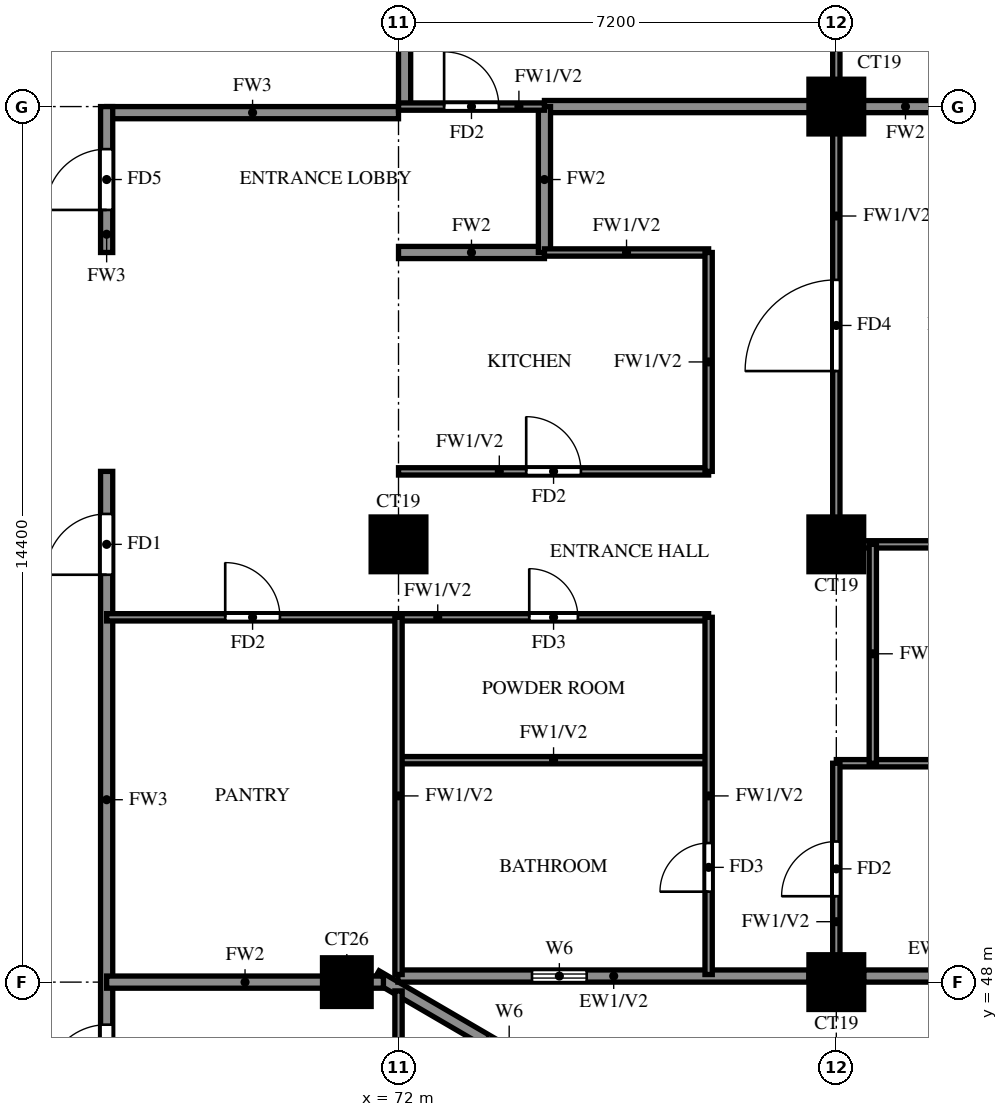
"""IFC4 building model, lengths in metres.
Left out: names, types, materials, properties, quantities, classifications, styles, units other than length and angle.
Written with IfcOpenShell. Run it as: python <this file> out.ifc"""

import sys

from ifc_helpers import new_model, si_unit, direction, frame, frame_2d, origin, origin_2d, place, context, subcontext, project, spatial, rectangle, extrude, source, transform, mapped, element, fill, save


model = new_model("IFC4")
c1 = context("Model", 3, precision=1e-05, world=origin(), true_north=direction((0.0, 1.0)))
c2 = subcontext(c1, "Body", "Model", "MODEL_VIEW")
j1 = project(units=[si_unit("LENGTHUNIT", "METRE"), si_unit("PLANEANGLEUNIT", "RADIAN")], contexts=[c1])
p1 = place(None, origin())
s1 = spatial("IfcSite", under=j1, at=p1, CompositionType="ELEMENT")
p2 = place(p1, origin())
s2 = spatial("IfcBuilding", under=s1, at=p2, CompositionType="ELEMENT")
p3 = place(p2, frame((0.0, 0.0, 195.5)))
s3 = spatial("IfcBuildingStorey", under=s2, at=p3, CompositionType="ELEMENT", Elevation=195.5)
m1 = source(origin(), c2, "Body", "SweptSolid", [
    extrude(rectangle(XDim=0.8, YDim=0.8, at=origin_2d()), origin(), (0.0, 0.0, 1.0), 3.2),
])
p4 = place(p3, frame((71.15, 48.0, 0.0), z_axis=(0.0, 0.0, 1.0), x_axis=(1.0, 0.0, 0.0)))
e1 = element("IfcColumn", 1, at=p4, inside=s3, PredefinedType="COLUMN", context=c2, shape_type="MappedRepresentation", body=[
    mapped(m1, transform((0.0, 0.0, 0.0))),
])
m2 = source(origin(), c2, "Body", "SweptSolid", [
    extrude(rectangle(XDim=0.9, YDim=0.9, at=origin_2d()), origin(), (0.0, 0.0, 1.0), 3.2),
])
for number, where, z_axis, x_axis in (
    (2, (79.2, 48.0, 0.0), (0.0, 0.0, 1.0), (1.0, 0.0, 0.0)),
    (3, (72.0, 55.2, 0.0), (0.0, 0.0, 1.0), (1.0, 0.0, 0.0)),
    (4, (79.2, 55.2, 0.0), (0.0, 0.0, 1.0), (1.0, 0.0, 0.0)),
    (5, (79.2, 62.4, 0.0), (0.0, 0.0, 1.0), (1.0, 0.0, 0.0)),
):
    element("IfcColumn", number, at=place(p3, frame(where, z_axis=z_axis, x_axis=x_axis)), inside=s3, PredefinedType="COLUMN", context=c2, shape_type="MappedRepresentation", body=[
        mapped(m2, transform((0.0, 0.0, 0.0))),
    ])
p5 = place(p3, frame((85.719, 39.881, 0.0), z_axis=(0.0, 0.0, 1.0), x_axis=(-0.86377618652, 0.503875678716, 0.0)))
e6 = element("IfcWall", 6, at=p5, inside=s3, PredefinedType="SOLIDWALL", context=c2, shape_type="SweptSolid", body=[
    extrude(rectangle(XDim=16.311, YDim=0.2, at=frame_2d((8.156, 0.0))), origin(), (0.0, 0.0, 1.0), 3.2),
])
p6 = place(p5, frame((13.326, 0.0, 1.5)))
e7 = element("IfcOpeningElement", 7, at=p6, cuts=e6, PredefinedType="OPENING", context=c2, shape_type="SweptSolid", body=[
    extrude(rectangle(XDim=0.9, YDim=0.9, at=frame_2d((0.45, 0.45))), frame((0.0, 0.11, 0.0), z_axis=(0.0, -1.0, 0.0), x_axis=(1.0, 0.0, 0.0)), (0.0, 0.0, 1.0), 0.22),
])
p7 = place(p3, frame((71.99, 48.1, 0.0), z_axis=(0.0, 0.0, 1.0), x_axis=(1.0, 0.0, 0.0)))
e8 = element("IfcWall", 8, at=p7, inside=s3, PredefinedType="SOLIDWALL", context=c2, shape_type="SweptSolid", body=[
    extrude(rectangle(XDim=6.76, YDim=0.2, at=frame_2d((3.38, 0.0))), origin(), (0.0, 0.0, 1.0), 3.2),
])
p8 = place(p7, frame((2.205, 0.0, 1.5)))
e9 = element("IfcOpeningElement", 9, at=p8, cuts=e8, PredefinedType="OPENING", context=c2, shape_type="SweptSolid", body=[
    extrude(rectangle(XDim=0.9, YDim=0.9, at=frame_2d((0.45, 0.45))), frame((0.0, 0.11, 0.0), z_axis=(0.0, -1.0, 0.0), x_axis=(1.0, 0.0, 0.0)), (0.0, 0.0, 1.0), 0.22),
])
p9 = place(p3, frame((79.65, 48.1, 0.0), z_axis=(0.0, 0.0, 1.0), x_axis=(1.0, 0.0, 0.0)))
e10 = element("IfcWall", 10, at=p9, inside=s3, PredefinedType="SOLIDWALL", context=c2, shape_type="SweptSolid", body=[
    extrude(rectangle(XDim=5.75, YDim=0.2, at=frame_2d((2.875, 0.0))), origin(), (0.0, 0.0, 1.0), 3.2),
])
p10 = place(p9, frame((1.675, 0.0, 0.6)))
e11 = element("IfcOpeningElement", 11, at=p10, cuts=e10, PredefinedType="OPENING", context=c2, shape_type="SweptSolid", body=[
    extrude(rectangle(XDim=2.4, YDim=2.4, at=frame_2d((1.2, 1.2))), frame((0.0, 0.11, 0.0), z_axis=(0.0, -1.0, 0.0), x_axis=(1.0, 0.0, 0.0)), (0.0, 0.0, 1.0), 0.22),
])
p11 = place(p3, frame((67.2, 62.3, 0.0), z_axis=(0.0, 0.0, 1.0), x_axis=(1.0, 0.0, 0.0)))
e12 = element("IfcWall", 12, at=p11, inside=s3, PredefinedType="SOLIDWALL", context=c2, shape_type="SweptSolid", body=[
    extrude(rectangle(XDim=4.8, YDim=0.2, at=frame_2d((2.4, 0.0))), origin(), (0.0, 0.0, 1.0), 3.2),
])
p12 = place(p3, frame((67.2, 45.6, 0.0), z_axis=(0.0, 0.0, 1.0), x_axis=(0.0, 1.0, 0.0)))
e13 = element("IfcWall", 13, at=p12, inside=s3, PredefinedType="SOLIDWALL", context=c2, shape_type="SweptSolid", body=[
    extrude(rectangle(XDim=10.8, YDim=0.2, at=frame_2d((5.4, 0.0))), origin(), (0.0, 0.0, 1.0), 3.2),
])
p13 = place(p12, frame((9.1, 0.0, 0.0)))
e14 = element("IfcOpeningElement", 14, at=p13, cuts=e13, PredefinedType="OPENING", context=c2, shape_type="SweptSolid", body=[
    extrude(rectangle(XDim=1.0, YDim=2.1, at=frame_2d((0.5, 1.05))), frame((0.0, 0.11, 0.0), z_axis=(0.0, -1.0, 0.0), x_axis=(1.0, 0.0, 0.0)), (0.0, 0.0, 1.0), 0.22),
])
p14 = place(p12, frame((0.7, 0.0, 0.0)))
e15 = element("IfcOpeningElement", 15, at=p14, cuts=e13, PredefinedType="OPENING", context=c2, shape_type="SweptSolid", body=[
    extrude(rectangle(XDim=1.0, YDim=2.1, at=frame_2d((0.5, 1.05))), frame((0.0, 0.11, 0.0), z_axis=(0.0, -1.0, 0.0), x_axis=(1.0, 0.0, 0.0)), (0.0, 0.0, 1.0), 0.22),
])
p15 = place(p3, frame((67.2, 60.0, 0.0), z_axis=(0.0, 0.0, 1.0), x_axis=(0.0, 1.0, 0.0)))
e16 = element("IfcWall", 16, at=p15, inside=s3, PredefinedType="SOLIDWALL", context=c2, shape_type="SweptSolid", body=[
    extrude(rectangle(XDim=2.4, YDim=0.2, at=frame_2d((1.2, 0.0))), origin(), (0.0, 0.0, 1.0), 3.2),
])
p16 = place(p15, frame((0.7, 0.0, 0.0)))
e17 = element("IfcOpeningElement", 17, at=p16, cuts=e16, PredefinedType="OPENING", context=c2, shape_type="SweptSolid", body=[
    extrude(rectangle(XDim=1.0, YDim=2.1, at=frame_2d((0.5, 1.05))), frame((0.0, 0.11, 0.0), z_axis=(0.0, -1.0, 0.0), x_axis=(1.0, 0.0, 0.0)), (0.0, 0.0, 1.0), 0.22),
])
p17 = place(p3, frame((72.1, 62.4, 0.0), z_axis=(0.0, 0.0, 1.0), x_axis=(0.0, 1.0, 0.0)))
e18 = element("IfcWall", 18, at=p17, inside=s3, PredefinedType="SOLIDWALL", context=c2, shape_type="SweptSolid", body=[
    extrude(rectangle(XDim=15.6, YDim=0.2, at=frame_2d((7.8, 0.0))), origin(), (0.0, 0.0, 1.0), 3.2),
])
p18 = place(p3, frame((67.2, 48.0, 0.0), z_axis=(0.0, 0.0, 1.0), x_axis=(1.0, 0.0, 0.0)))
e19 = element("IfcWall", 19, at=p18, inside=s3, PredefinedType="SOLIDWALL", context=c2, shape_type="SweptSolid", body=[
    extrude(rectangle(XDim=4.552, YDim=0.2, at=frame_2d((2.276, 0.0))), origin(), (0.0, 0.0, 1.0), 3.2),
])
p19 = place(p3, frame((72.0, 60.0, 0.0), z_axis=(0.0, 0.0, 1.0), x_axis=(1.0, 0.0, 0.0)))
e20 = element("IfcWall", 20, at=p19, inside=s3, PredefinedType="SOLIDWALL", context=c2, shape_type="SweptSolid", body=[
    extrude(rectangle(XDim=2.4, YDim=0.2, at=frame_2d((1.2, 0.0))), origin(), (0.0, 0.0, 1.0), 3.2),
])
p20 = place(p3, frame((74.4, 62.4, 0.0), z_axis=(0.0, 0.0, 1.0), x_axis=(1.0, 0.0, 0.0)))
e21 = element("IfcWall", 21, at=p20, inside=s3, PredefinedType="SOLIDWALL", context=c2, shape_type="SweptSolid", body=[
    extrude(rectangle(XDim=11.875, YDim=0.2, at=frame_2d((5.938, 0.0))), origin(), (0.0, 0.0, 1.0), 3.2),
])
p21 = place(p3, frame((74.4, 60.0, 0.0), z_axis=(0.0, 0.0, 1.0), x_axis=(0.0, 1.0, 0.0)))
e22 = element("IfcWall", 22, at=p21, inside=s3, PredefinedType="SOLIDWALL", context=c2, shape_type="SweptSolid", body=[
    extrude(rectangle(XDim=2.4, YDim=0.2, at=frame_2d((1.2, 0.0))), origin(), (0.0, 0.0, 1.0), 3.2),
])
p22 = place(p3, frame((79.2, 51.6, 0.0), z_axis=(0.0, 0.0, 1.0), x_axis=(1.0, 0.0, 0.0)))
e23 = element("IfcWall", 23, at=p22, inside=s3, PredefinedType="PARTITIONING", context=c2, shape_type="SweptSolid", body=[
    extrude(rectangle(XDim=7.075, YDim=0.12, at=frame_2d((3.538, 0.0))), origin(), (0.0, 0.0, 1.0), 2.3),
])
p23 = place(p22, frame((3.438, 0.0, 0.0)))
e24 = element("IfcOpeningElement", 24, at=p23, cuts=e23, PredefinedType="OPENING", context=c2, shape_type="SweptSolid", body=[
    extrude(rectangle(XDim=0.8, YDim=2.1, at=frame_2d((0.4, 1.05))), frame((0.0, 0.07, 0.0), z_axis=(0.0, -1.0, 0.0), x_axis=(1.0, 0.0, 0.0)), (0.0, 0.0, 1.0), 0.14),
])
p24 = place(p3, frame((72.0, 51.65, 0.0), z_axis=(0.0, 0.0, 1.0), x_axis=(1.0, 0.0, 0.0)))
e25 = element("IfcWall", 25, at=p24, inside=s3, PredefinedType="PARTITIONING", context=c2, shape_type="SweptSolid", body=[
    extrude(rectangle(XDim=5.1, YDim=0.12, at=frame_2d((2.55, 0.0))), origin(), (0.0, 0.0, 1.0), 3.2),
])
p25 = place(p3, frame((67.2, 54.0, 0.0), z_axis=(0.0, 0.0, 1.0), x_axis=(1.0, 0.0, 0.0)))
e26 = element("IfcWall", 26, at=p25, inside=s3, PredefinedType="PARTITIONING", context=c2, shape_type="SweptSolid", body=[
    extrude(rectangle(XDim=9.9, YDim=0.12, at=frame_2d((4.95, 0.0))), origin(), (0.0, 0.0, 1.0), 3.2),
])
p26 = place(p25, frame((6.95, 0.0, 0.0)))
e27 = element("IfcOpeningElement", 27, at=p26, cuts=e26, PredefinedType="OPENING", context=c2, shape_type="SweptSolid", body=[
    extrude(rectangle(XDim=0.8, YDim=2.1, at=frame_2d((0.4, 1.05))), frame((0.0, 0.07, 0.0), z_axis=(0.0, -1.0, 0.0), x_axis=(1.0, 0.0, 0.0)), (0.0, 0.0, 1.0), 0.14),
])
p27 = place(p25, frame((1.95, 0.0, 0.0)))
e28 = element("IfcOpeningElement", 28, at=p27, cuts=e26, PredefinedType="OPENING", context=c2, shape_type="SweptSolid", body=[
    extrude(rectangle(XDim=0.9, YDim=2.1, at=frame_2d((0.45, 1.05))), frame((0.0, 0.07, 0.0), z_axis=(0.0, -1.0, 0.0), x_axis=(1.0, 0.0, 0.0)), (0.0, 0.0, 1.0), 0.14),
])
p28 = place(p3, frame((79.2, 55.2, 0.0), z_axis=(0.0, 0.0, 1.0), x_axis=(1.0, 0.0, 0.0)))
e29 = element("IfcWall", 29, at=p28, inside=s3, PredefinedType="PARTITIONING", context=c2, shape_type="SweptSolid", body=[
    extrude(rectangle(XDim=7.075, YDim=0.12, at=frame_2d((3.538, 0.0))), origin(), (0.0, 0.0, 1.0), 3.2),
])
p29 = place(p3, frame((72.0, 56.4, 0.0), z_axis=(0.0, 0.0, 1.0), x_axis=(1.0, 0.0, 0.0)))
e30 = element("IfcWall", 30, at=p29, inside=s3, PredefinedType="PARTITIONING", context=c2, shape_type="SweptSolid", body=[
    extrude(rectangle(XDim=5.1, YDim=0.12, at=frame_2d((2.55, 0.0))), origin(), (0.0, 0.0, 1.0), 3.2),
])
p30 = place(p29, frame((2.1, 0.0, 0.0)))
e31 = element("IfcOpeningElement", 31, at=p30, cuts=e30, PredefinedType="OPENING", context=c2, shape_type="SweptSolid", body=[
    extrude(rectangle(XDim=0.9, YDim=2.1, at=frame_2d((0.45, 1.05))), frame((0.0, 0.07, 0.0), z_axis=(0.0, -1.0, 0.0), x_axis=(1.0, 0.0, 0.0)), (0.0, 0.0, 1.0), 0.14),
])
p31 = place(p3, frame((74.4, 60.0, 0.0), z_axis=(0.0, 0.0, 1.0), x_axis=(1.0, 0.0, 0.0)))
e32 = element("IfcWall", 32, at=p31, inside=s3, PredefinedType="PARTITIONING", context=c2, shape_type="SweptSolid", body=[
    extrude(rectangle(XDim=2.7, YDim=0.12, at=frame_2d((1.35, 0.0))), origin(), (0.0, 0.0, 1.0), 3.2),
])
p32 = place(p3, frame((72.0, 62.4, 0.0), z_axis=(0.0, 0.0, 1.0), x_axis=(1.0, 0.0, 0.0)))
e33 = element("IfcWall", 33, at=p32, inside=s3, PredefinedType="PARTITIONING", context=c2, shape_type="SweptSolid", body=[
    extrude(rectangle(XDim=2.4, YDim=0.12, at=frame_2d((1.2, 0.0))), origin(), (0.0, 0.0, 1.0), 3.2),
])
p33 = place(p32, frame((0.75, 0.0, 0.0)))
e34 = element("IfcOpeningElement", 34, at=p33, cuts=e33, PredefinedType="OPENING", context=c2, shape_type="SweptSolid", body=[
    extrude(rectangle(XDim=0.9, YDim=2.1, at=frame_2d((0.45, 1.05))), frame((0.0, 0.07, 0.0), z_axis=(0.0, -1.0, 0.0), x_axis=(1.0, 0.0, 0.0)), (0.0, 0.0, 1.0), 0.14),
])
p34 = place(p3, frame((72.0, 39.725, 0.0), z_axis=(0.0, 0.0, 1.0), x_axis=(0.0, 1.0, 0.0)))
e35 = element("IfcWall", 35, at=p34, inside=s3, PredefinedType="PARTITIONING", context=c2, shape_type="SweptSolid", body=[
    extrude(rectangle(XDim=8.13, YDim=0.12, at=frame_2d((4.065, 0.0))), origin(), (0.0, 0.0, 1.0), 2.3),
])
p35 = place(p34, frame((1.788, 0.0, 0.0)))
e36 = element("IfcOpeningElement", 36, at=p35, cuts=e35, PredefinedType="OPENING", context=c2, shape_type="SweptSolid", body=[
    extrude(rectangle(XDim=1.5, YDim=2.1, at=frame_2d((0.75, 1.05))), frame((0.0, 0.07, 0.0), z_axis=(0.0, -1.0, 0.0), x_axis=(1.0, 0.0, 0.0)), (0.0, 0.0, 1.0), 0.14),
])
p36 = place(p34, frame((4.575, 0.0, 0.0)))
e37 = element("IfcOpeningElement", 37, at=p36, cuts=e35, PredefinedType="OPENING", context=c2, shape_type="SweptSolid", body=[
    extrude(rectangle(XDim=0.8, YDim=2.1, at=frame_2d((0.4, 1.05))), frame((0.0, 0.07, 0.0), z_axis=(0.0, -1.0, 0.0), x_axis=(1.0, 0.0, 0.0)), (0.0, 0.0, 1.0), 0.14),
])
p37 = place(p3, frame((72.0, 48.125, 0.0), z_axis=(0.0, 0.0, 1.0), x_axis=(0.0, 1.0, 0.0)))
e38 = element("IfcWall", 38, at=p37, inside=s3, PredefinedType="PARTITIONING", context=c2, shape_type="SweptSolid", body=[
    extrude(rectangle(XDim=5.875, YDim=0.12, at=frame_2d((2.938, 0.0))), origin(), (0.0, 0.0, 1.0), 3.2),
])
p38 = place(p3, frame((77.1, 48.125, 0.0), z_axis=(0.0, 0.0, 1.0), x_axis=(0.0, 1.0, 0.0)))
e39 = element("IfcWall", 39, at=p38, inside=s3, PredefinedType="PARTITIONING", context=c2, shape_type="SweptSolid", body=[
    extrude(rectangle(XDim=5.875, YDim=0.12, at=frame_2d((2.938, 0.0))), origin(), (0.0, 0.0, 1.0), 3.2),
])
p39 = place(p38, frame((1.363, 0.0, 0.0)))
e40 = element("IfcOpeningElement", 40, at=p39, cuts=e39, PredefinedType="OPENING", context=c2, shape_type="SweptSolid", body=[
    extrude(rectangle(XDim=0.8, YDim=2.1, at=frame_2d((0.4, 1.05))), frame((0.0, 0.07, 0.0), z_axis=(0.0, -1.0, 0.0), x_axis=(1.0, 0.0, 0.0)), (0.0, 0.0, 1.0), 0.14),
])
p40 = place(p3, frame((77.1, 56.4, 0.0), z_axis=(0.0, 0.0, 1.0), x_axis=(0.0, 1.0, 0.0)))
e41 = element("IfcWall", 41, at=p40, inside=s3, PredefinedType="PARTITIONING", context=c2, shape_type="SweptSolid", body=[
    extrude(rectangle(XDim=3.6, YDim=0.12, at=frame_2d((1.8, 0.0))), origin(), (0.0, 0.0, 1.0), 3.2),
])
p41 = place(p3, frame((79.2, 48.125, 0.0), z_axis=(0.0, 0.0, 1.0), x_axis=(0.0, 1.0, 0.0)))
e42 = element("IfcWall", 42, at=p41, inside=s3, PredefinedType="PARTITIONING", context=c2, shape_type="SweptSolid", body=[
    extrude(rectangle(XDim=3.475, YDim=0.12, at=frame_2d((1.738, 0.0))), origin(), (0.0, 0.0, 1.0), 3.2),
])
p42 = place(p41, frame((1.288, 0.0, 0.0)))
e43 = element("IfcOpeningElement", 43, at=p42, cuts=e42, PredefinedType="OPENING", context=c2, shape_type="SweptSolid", body=[
    extrude(rectangle(XDim=0.9, YDim=2.1, at=frame_2d((0.45, 1.05))), frame((0.0, 0.07, 0.0), z_axis=(0.0, -1.0, 0.0), x_axis=(1.0, 0.0, 0.0)), (0.0, 0.0, 1.0), 0.14),
])
p43 = place(p3, frame((79.2, 55.2, 0.0), z_axis=(0.0, 0.0, 1.0), x_axis=(0.0, 1.0, 0.0)))
e44 = element("IfcWall", 44, at=p43, inside=s3, PredefinedType="PARTITIONING", context=c2, shape_type="SweptSolid", body=[
    extrude(rectangle(XDim=10.8, YDim=0.12, at=frame_2d((5.4, 0.0))), origin(), (0.0, 0.0, 1.0), 3.2),
])
p44 = place(p43, frame((2.85, 0.0, 0.0)))
e45 = element("IfcOpeningElement", 45, at=p44, cuts=e44, PredefinedType="OPENING", context=c2, shape_type="SweptSolid", body=[
    extrude(rectangle(XDim=1.5, YDim=2.1, at=frame_2d((0.75, 1.05))), frame((0.0, 0.07, 0.0), z_axis=(0.0, -1.0, 0.0), x_axis=(1.0, 0.0, 0.0)), (0.0, 0.0, 1.0), 0.14),
])
p45 = place(p43, frame((8.55, 0.0, 0.0)))
e46 = element("IfcOpeningElement", 46, at=p45, cuts=e44, PredefinedType="OPENING", context=c2, shape_type="SweptSolid", body=[
    extrude(rectangle(XDim=0.9, YDim=2.1, at=frame_2d((0.45, 1.05))), frame((0.0, 0.07, 0.0), z_axis=(0.0, -1.0, 0.0), x_axis=(1.0, 0.0, 0.0)), (0.0, 0.0, 1.0), 0.14),
])
p46 = place(p3, frame((79.8, 51.6, 0.0), z_axis=(0.0, 0.0, 1.0), x_axis=(0.0, 1.0, 0.0)))
e47 = element("IfcWall", 47, at=p46, inside=s3, PredefinedType="PARTITIONING", context=c2, shape_type="SweptSolid", body=[
    extrude(rectangle(XDim=3.6, YDim=0.12, at=frame_2d((1.8, 0.0))), origin(), (0.0, 0.0, 1.0), 3.2),
])
p47 = place(p8, origin())
e48 = element("IfcWindow", 48, at=p47, inside=s3, PartitioningType="SINGLE_PANEL", PredefinedType="WINDOW", context=c2, shape_type="SweptSolid", body=[
    extrude(rectangle(XDim=0.9, YDim=0.9, at=frame_2d((0.45, 0.45))), frame((0.0, 0.03, 0.0), z_axis=(0.0, -1.0, 0.0), x_axis=(1.0, 0.0, 0.0)), (0.0, 0.0, 1.0), 0.06),
])
fill(e9, e48)
p48 = place(p13, origin())
e49 = element("IfcDoor", 49, at=p48, inside=s3, OperationType="SINGLE_SWING_LEFT", PredefinedType="DOOR", context=c2, shape_type="SweptSolid", body=[
    extrude(rectangle(XDim=1.0, YDim=2.1, at=frame_2d((0.5, 1.05))), frame((0.0, 0.025, 0.0), z_axis=(0.0, -1.0, 0.0), x_axis=(1.0, 0.0, 0.0)), (0.0, 0.0, 1.0), 0.05),
])
fill(e14, e49)
p49 = place(p42, origin())
e50 = element("IfcDoor", 50, at=p49, inside=s3, OperationType="SINGLE_SWING_LEFT", PredefinedType="DOOR", context=c2, shape_type="SweptSolid", body=[
    extrude(rectangle(XDim=0.9, YDim=2.1, at=frame_2d((0.45, 1.05))), frame((0.0, 0.025, 0.0), z_axis=(0.0, -1.0, 0.0), x_axis=(1.0, 0.0, 0.0)), (0.0, 0.0, 1.0), 0.05),
])
fill(e43, e50)
p50 = place(p44, origin())
e51 = element("IfcDoor", 51, at=p50, inside=s3, OperationType="SINGLE_SWING_LEFT", PredefinedType="DOOR", context=c2, shape_type="SweptSolid", body=[
    extrude(rectangle(XDim=1.5, YDim=2.1, at=frame_2d((0.75, 1.05))), frame((0.0, 0.025, 0.0), z_axis=(0.0, -1.0, 0.0), x_axis=(1.0, 0.0, 0.0)), (0.0, 0.0, 1.0), 0.05),
])
fill(e45, e51)
p51 = place(p39, origin())
e52 = element("IfcDoor", 52, at=p51, inside=s3, OperationType="SINGLE_SWING_LEFT", PredefinedType="DOOR", context=c2, shape_type="SweptSolid", body=[
    extrude(rectangle(XDim=0.8, YDim=2.1, at=frame_2d((0.4, 1.05))), frame((0.0, 0.025, 0.0), z_axis=(0.0, -1.0, 0.0), x_axis=(1.0, 0.0, 0.0)), (0.0, 0.0, 1.0), 0.05),
])
fill(e40, e52)
p52 = place(p26, origin())
e53 = element("IfcDoor", 53, at=p52, inside=s3, OperationType="SINGLE_SWING_RIGHT", PredefinedType="DOOR", context=c2, shape_type="SweptSolid", body=[
    extrude(rectangle(XDim=0.8, YDim=2.1, at=frame_2d((0.4, 1.05))), frame((0.0, 0.025, 0.0), z_axis=(0.0, -1.0, 0.0), x_axis=(1.0, 0.0, 0.0)), (0.0, 0.0, 1.0), 0.05),
])
fill(e27, e53)
p53 = place(p30, origin())
e54 = element("IfcDoor", 54, at=p53, inside=s3, OperationType="SINGLE_SWING_LEFT", PredefinedType="DOOR", context=c2, shape_type="SweptSolid", body=[
    extrude(rectangle(XDim=0.9, YDim=2.1, at=frame_2d((0.45, 1.05))), frame((0.0, 0.025, 0.0), z_axis=(0.0, -1.0, 0.0), x_axis=(1.0, 0.0, 0.0)), (0.0, 0.0, 1.0), 0.05),
])
fill(e31, e54)
p54 = place(p27, origin())
e55 = element("IfcDoor", 55, at=p54, inside=s3, OperationType="SINGLE_SWING_LEFT", PredefinedType="DOOR", context=c2, shape_type="SweptSolid", body=[
    extrude(rectangle(XDim=0.9, YDim=2.1, at=frame_2d((0.45, 1.05))), frame((0.0, 0.025, 0.0), z_axis=(0.0, -1.0, 0.0), x_axis=(1.0, 0.0, 0.0)), (0.0, 0.0, 1.0), 0.05),
])
fill(e28, e55)
p55 = place(p33, origin())
e56 = element("IfcDoor", 56, at=p55, inside=s3, OperationType="SINGLE_SWING_LEFT", PredefinedType="DOOR", context=c2, shape_type="SweptSolid", body=[
    extrude(rectangle(XDim=0.9, YDim=2.1, at=frame_2d((0.45, 1.05))), frame((0.0, 0.025, 0.0), z_axis=(0.0, -1.0, 0.0), x_axis=(1.0, 0.0, 0.0)), (0.0, 0.0, 1.0), 0.05),
])
fill(e34, e56)
p56 = place(p16, origin())
e57 = element("IfcDoor", 57, at=p56, inside=s3, OperationType="SINGLE_SWING_RIGHT", PredefinedType="DOOR", context=c2, shape_type="SweptSolid", body=[
    extrude(rectangle(XDim=1.0, YDim=2.1, at=frame_2d((0.5, 1.05))), frame((0.0, 0.025, 0.0), z_axis=(0.0, -1.0, 0.0), x_axis=(1.0, 0.0, 0.0)), (0.0, 0.0, 1.0), 0.05),
])
fill(e17, e57)
p57 = place(p14, origin())
e58 = element("IfcDoor", 58, at=p57, inside=s3, OperationType="SINGLE_SWING_RIGHT", PredefinedType="DOOR", context=c2, shape_type="SweptSolid", body=[
    extrude(rectangle(XDim=1.0, YDim=2.1, at=frame_2d((0.5, 1.05))), frame((0.0, 0.025, 0.0), z_axis=(0.0, -1.0, 0.0), x_axis=(1.0, 0.0, 0.0)), (0.0, 0.0, 1.0), 0.05),
])
fill(e15, e58)
save(model, sys.argv[1])
